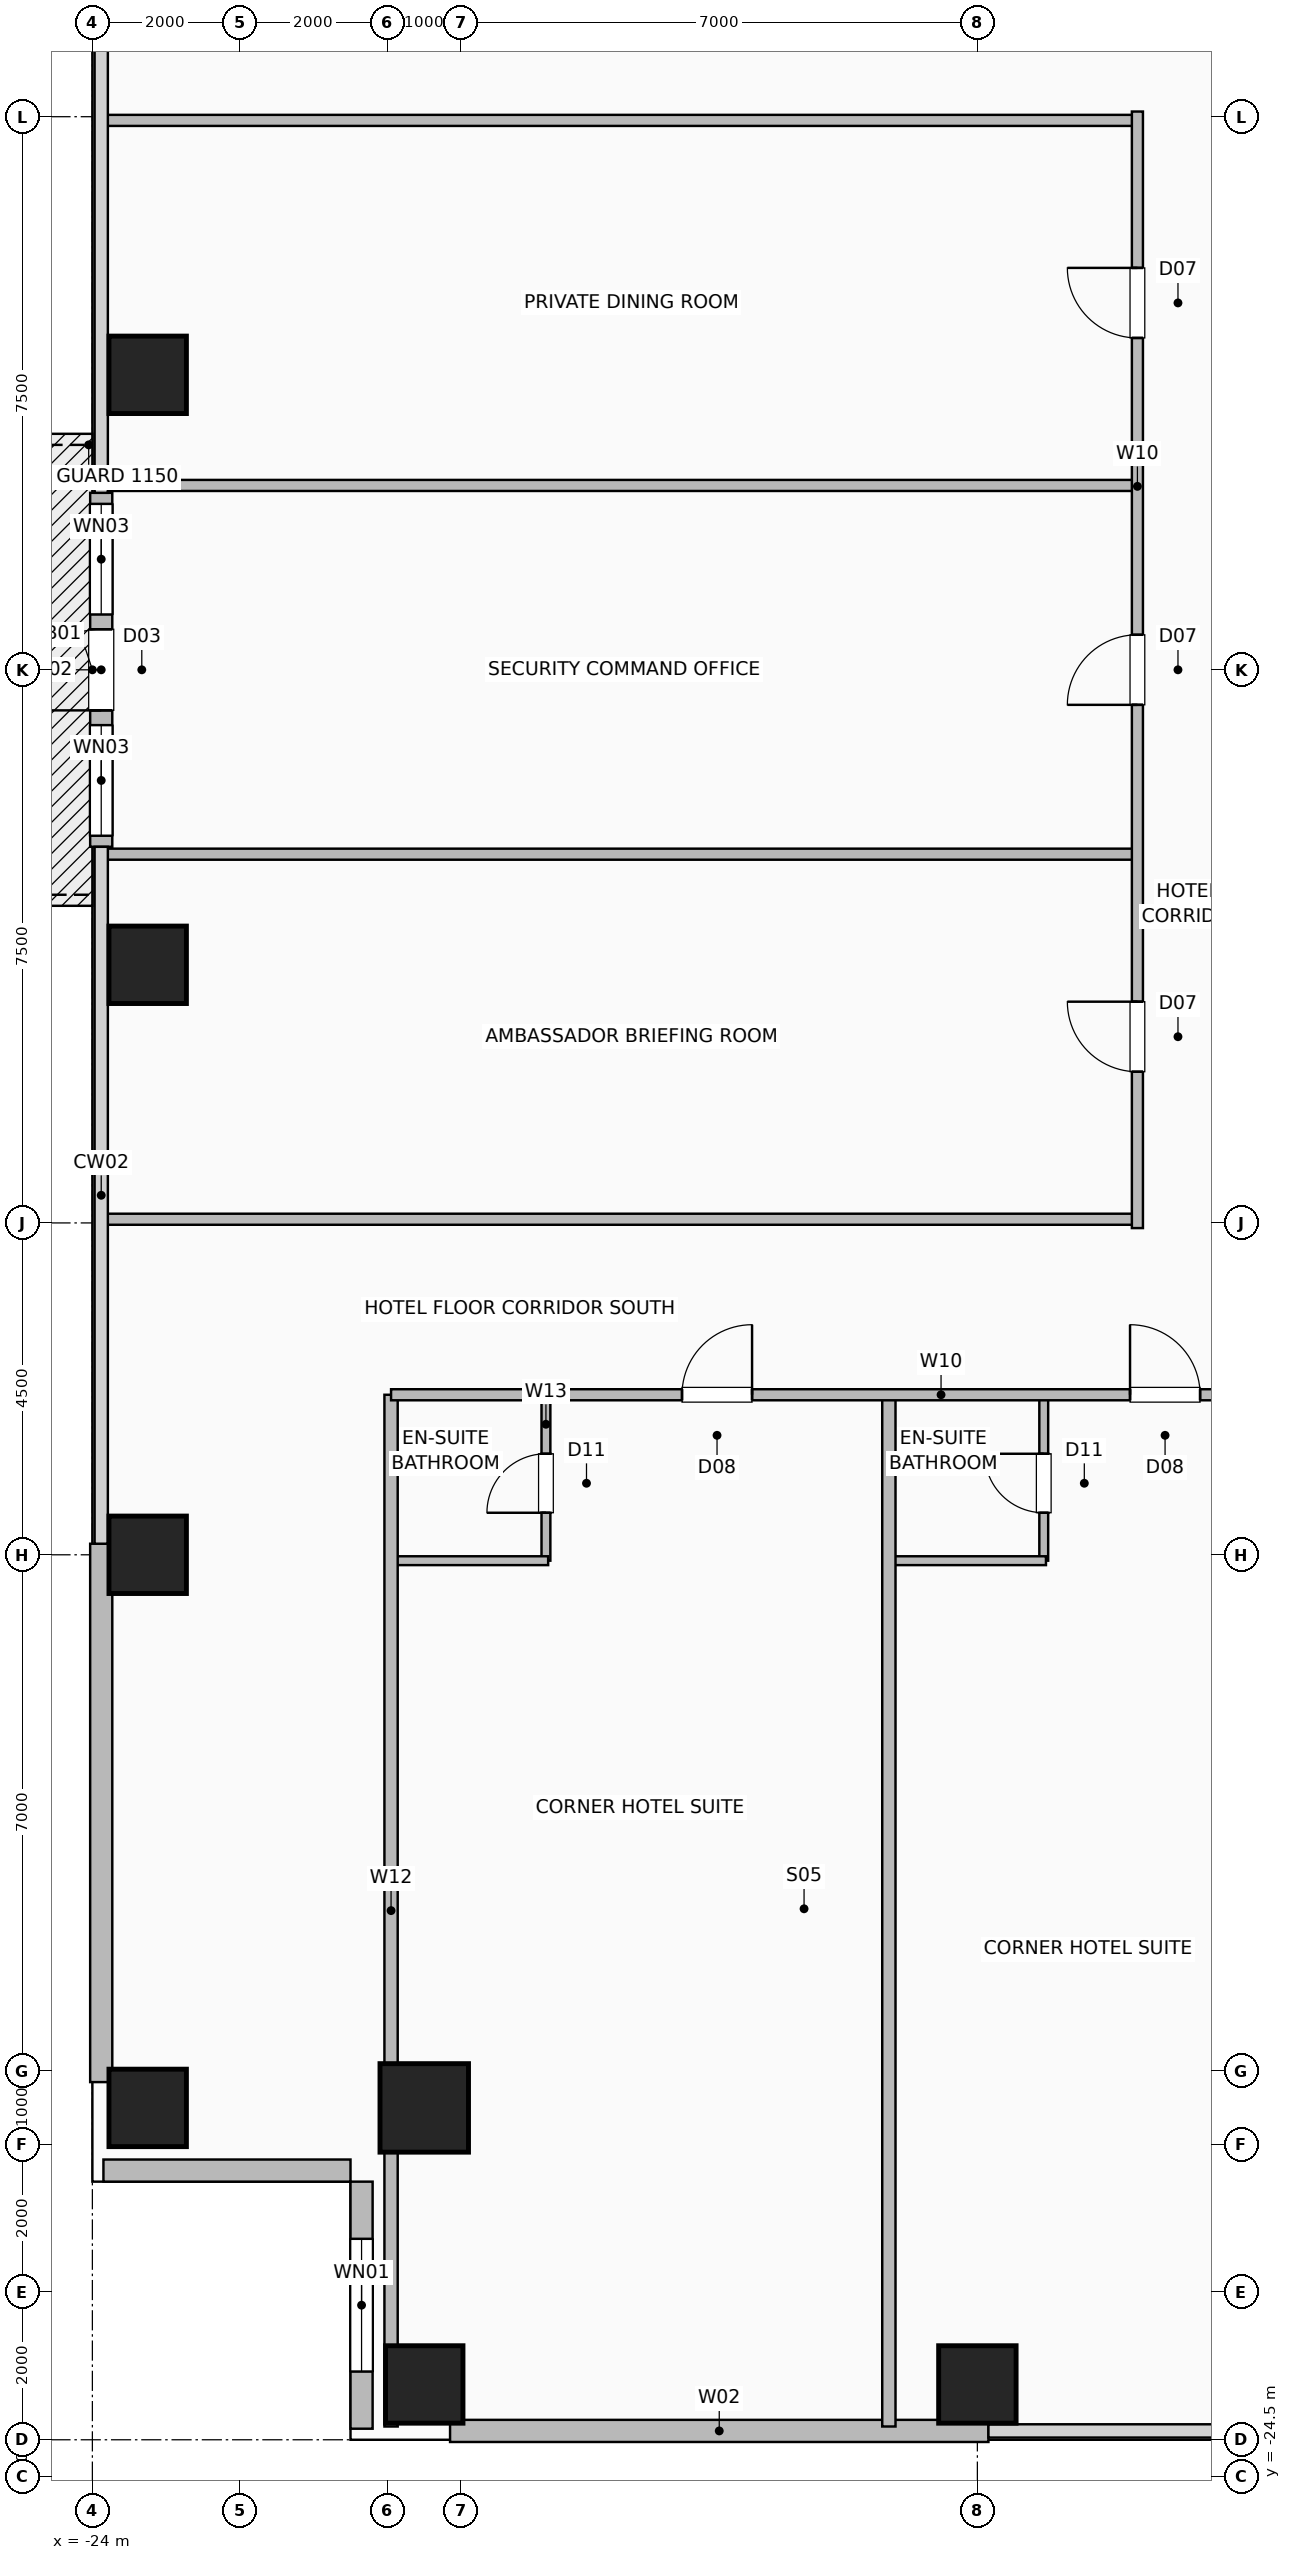
"""IFC4 building model, lengths in metres.
Left out: names, types, materials, properties, quantities, classifications, styles, units other than length and angle.
Written with IfcOpenShell. Run it as: python <this file> out.ifc"""

import sys

from ifc_helpers import new_model, si_unit, direction, frame, frame_2d, origin, origin_2d, place, context, subcontext, project, spatial, rectangle, hollow_rectangle, extrude, element, fill, save


model = new_model("IFC4")
c1 = context("Model", 3, precision=1e-05, world=origin(), true_north=direction((0.0, 1.0)))
c2 = subcontext(c1, "Body", "Model", "MODEL_VIEW")
j1 = project(units=[si_unit("LENGTHUNIT", "METRE"), si_unit("PLANEANGLEUNIT", "RADIAN")], contexts=[c1])
p1 = place(None, origin())
s1 = spatial("IfcSite", under=j1, at=p1, CompositionType="ELEMENT")
p2 = place(p1, origin())
s2 = spatial("IfcBuilding", under=s1, at=p2, CompositionType="ELEMENT")
p3 = place(p2, frame((0.0, 0.0, 76.0)))
s3 = spatial("IfcBuildingStorey", under=s2, at=p3, CompositionType="ELEMENT", Elevation=76.0)
for number, where, z_axis, x_axis in (
    (1, (-19.5, -23.25, 0.0), (0.0, 0.0, 1.0), (1.0, 0.0, 0.0)),
    (2, (-23.25, -19.5, 0.0), (0.0, 0.0, 1.0), (1.0, 0.0, 0.0)),
    (3, (-12.0, -23.25, 0.0), (0.0, 0.0, 1.0), (1.0, 0.0, 0.0)),
    (4, (-23.25, -12.0, 0.0), (0.0, 0.0, 1.0), (1.0, 0.0, 0.0)),
    (5, (-23.25, -4.0, 0.0), (0.0, 0.0, 1.0), (1.0, 0.0, 0.0)),
    (6, (-23.25, 4.0, 0.0), (0.0, 0.0, 1.0), (1.0, 0.0, 0.0)),
):
    element("IfcColumn", number, at=place(p3, frame(where, z_axis=z_axis, x_axis=x_axis)), inside=s3, PredefinedType="COLUMN", context=c2, shape_type="SweptSolid", body=[
        extrude(hollow_rectangle(XDim=1.05, YDim=1.05, WallThickness=0.05, at=origin_2d()), origin(), (0.0, 0.0, 1.0), 3.5),
    ])
p4 = place(p3, frame((-19.5, -19.5, 0.0), z_axis=(0.0, 0.0, 1.0), x_axis=(1.0, 0.0, 0.0)))
e7 = element("IfcColumn", 7, at=p4, inside=s3, PredefinedType="COLUMN", context=c2, shape_type="SweptSolid", body=[
    extrude(hollow_rectangle(XDim=1.2, YDim=1.2, WallThickness=0.055, at=origin_2d()), origin(), (0.0, 0.0, 1.0), 3.5),
])
for number, where, z_axis, x_axis in (
    (8, (-19.15, -23.88, 0.0), (0.0, 0.0, 1.0), (1.0, 0.0, 0.0)),
    (9, (-23.88, -19.15, 0.0), (0.0, 0.0, 1.0), (0.0, 1.0, 0.0)),
):
    element("IfcWall", number, at=place(p3, frame(where, z_axis=z_axis, x_axis=x_axis)), inside=s3, PredefinedType="SOLIDWALL", context=c2, shape_type="SweptSolid", body=[
        extrude(rectangle(XDim=7.3, YDim=0.3, at=frame_2d((3.65, 0.0))), origin(), (0.0, 0.0, 1.0), 3.25),
    ])
p5 = place(p3, frame((-23.88, -2.4, 0.0), z_axis=(0.0, 0.0, 1.0), x_axis=(0.0, 1.0, 0.0)))
e10 = element("IfcWall", 10, at=p5, inside=s3, PredefinedType="SOLIDWALL", context=c2, shape_type="SweptSolid", body=[
    extrude(rectangle(XDim=4.8, YDim=0.3, at=frame_2d((2.4, 0.0))), origin(), (0.0, 0.0, 1.0), 3.25),
])
p6 = place(p5, frame((1.85, 0.0, 0.0)))
e11 = element("IfcOpeningElement", 11, at=p6, cuts=e10, PredefinedType="OPENING", context=c2, shape_type="SweptSolid", body=[
    extrude(rectangle(XDim=1.1, YDim=2.2, at=frame_2d((0.55, 1.1))), frame((0.0, 0.16, 0.0), z_axis=(0.0, -1.0, 0.0), x_axis=(1.0, 0.0, 0.0)), (0.0, 0.0, 1.0), 0.32),
])
p7 = place(p5, frame((0.15, 0.0, 0.85)))
e12 = element("IfcOpeningElement", 12, at=p7, cuts=e10, PredefinedType="OPENING", context=c2, shape_type="SweptSolid", body=[
    extrude(rectangle(XDim=1.5, YDim=1.8, at=frame_2d((0.75, 0.9))), frame((0.0, 0.16, 0.0), z_axis=(0.0, -1.0, 0.0), x_axis=(1.0, 0.0, 0.0)), (0.0, 0.0, 1.0), 0.32),
])
p8 = place(p5, frame((3.15, 0.0, 0.85)))
e13 = element("IfcOpeningElement", 13, at=p8, cuts=e10, PredefinedType="OPENING", context=c2, shape_type="SweptSolid", body=[
    extrude(rectangle(XDim=1.5, YDim=1.8, at=frame_2d((0.75, 0.9))), frame((0.0, 0.16, 0.0), z_axis=(0.0, -1.0, 0.0), x_axis=(1.0, 0.0, 0.0)), (0.0, 0.0, 1.0), 0.32),
])
p9 = place(p3, frame((-20.35, -23.85, 0.0), z_axis=(0.0, 0.0, 1.0), x_axis=(0.0, 1.0, 0.0)))
e14 = element("IfcWall", 14, at=p9, inside=s3, PredefinedType="SOLIDWALL", context=c2, shape_type="SweptSolid", body=[
    extrude(rectangle(XDim=3.35, YDim=0.3, at=frame_2d((1.675, 0.0))), origin(), (0.0, 0.0, 1.0), 3.25),
])
p10 = place(p9, frame((0.775, 0.0, 0.9)))
e15 = element("IfcOpeningElement", 15, at=p10, cuts=e14, PredefinedType="OPENING", context=c2, shape_type="SweptSolid", body=[
    extrude(rectangle(XDim=1.8, YDim=1.8, at=frame_2d((0.9, 0.9))), frame((0.0, 0.16, 0.0), z_axis=(0.0, -1.0, 0.0), x_axis=(1.0, 0.0, 0.0)), (0.0, 0.0, 1.0), 0.32),
])
p11 = place(p3, frame((-23.85, -20.35, 0.0), z_axis=(0.0, 0.0, 1.0), x_axis=(1.0, 0.0, 0.0)))
e16 = element("IfcWall", 16, at=p11, inside=s3, PredefinedType="SOLIDWALL", context=c2, shape_type="SweptSolid", body=[
    extrude(rectangle(XDim=3.35, YDim=0.3, at=frame_2d((1.675, 0.0))), origin(), (0.0, 0.0, 1.0), 3.25),
])
p12 = place(p3, frame((-17.85, -12.08, 0.0), z_axis=(0.0, 0.0, 1.0), x_axis=(0.0, 1.0, 0.0)))
e17 = element("IfcWall", 17, at=p12, inside=s3, PredefinedType="PLUMBINGWALL", context=c2, shape_type="SweptSolid", body=[
    extrude(rectangle(XDim=2.25, YDim=0.12, at=frame_2d((1.125, 0.0))), origin(), (0.0, 0.0, 1.0), 3.25),
])
p13 = place(p12, frame((0.65, 0.0, 0.0)))
e18 = element("IfcOpeningElement", 18, at=p13, cuts=e17, PredefinedType="OPENING", context=c2, shape_type="SweptSolid", body=[
    extrude(rectangle(XDim=0.8, YDim=2.05, at=frame_2d((0.4, 1.025))), frame((0.0, 0.07, 0.0), z_axis=(0.0, -1.0, 0.0), x_axis=(1.0, 0.0, 0.0)), (0.0, 0.0, 1.0), 0.14),
])
p14 = place(p3, frame((-19.92, -12.08, 0.0), z_axis=(0.0, 0.0, 1.0), x_axis=(1.0, 0.0, 0.0)))
e19 = element("IfcWall", 19, at=p14, inside=s3, PredefinedType="PLUMBINGWALL", context=c2, shape_type="SweptSolid", body=[
    extrude(rectangle(XDim=2.1, YDim=0.12, at=frame_2d((1.05, 0.0))), origin(), (0.0, 0.0, 1.0), 3.25),
])
p15 = place(p3, frame((-11.1, -12.08, 0.0), z_axis=(0.0, 0.0, 1.0), x_axis=(0.0, 1.0, 0.0)))
e20 = element("IfcWall", 20, at=p15, inside=s3, PredefinedType="PLUMBINGWALL", context=c2, shape_type="SweptSolid", body=[
    extrude(rectangle(XDim=2.25, YDim=0.12, at=frame_2d((1.125, 0.0))), origin(), (0.0, 0.0, 1.0), 3.25),
])
p16 = place(p15, frame((0.65, 0.0, 0.0)))
e21 = element("IfcOpeningElement", 21, at=p16, cuts=e20, PredefinedType="OPENING", context=c2, shape_type="SweptSolid", body=[
    extrude(rectangle(XDim=0.8, YDim=2.05, at=frame_2d((0.4, 1.025))), frame((0.0, 0.07, 0.0), z_axis=(0.0, -1.0, 0.0), x_axis=(1.0, 0.0, 0.0)), (0.0, 0.0, 1.0), 0.14),
])
p17 = place(p3, frame((-13.17, -12.08, 0.0), z_axis=(0.0, 0.0, 1.0), x_axis=(1.0, 0.0, 0.0)))
e22 = element("IfcWall", 22, at=p17, inside=s3, PredefinedType="PLUMBINGWALL", context=c2, shape_type="SweptSolid", body=[
    extrude(rectangle(XDim=2.1, YDim=0.12, at=frame_2d((1.05, 0.0))), origin(), (0.0, 0.0, 1.0), 3.25),
])
for number, where, z_axis, x_axis in (
    (23, (-19.95, -23.82, 0.0), (0.0, 0.0, 1.0), (0.0, 1.0, 0.0)),
    (24, (-13.2, -23.82, 0.0), (0.0, 0.0, 1.0), (0.0, 1.0, 0.0)),
):
    element("IfcWall", number, at=place(p3, frame(where, z_axis=z_axis, x_axis=x_axis)), inside=s3, PredefinedType="PARTITIONING", context=c2, shape_type="SweptSolid", body=[
        extrude(rectangle(XDim=13.99, YDim=0.18, at=frame_2d((6.995, 0.0))), origin(), (0.0, 0.0, 1.0), 3.25),
    ])
p18 = place(p3, frame((-19.95, -9.83, 0.0), z_axis=(0.0, 0.0, 1.0), x_axis=(1.0, 0.0, 0.0)))
e25 = element("IfcWall", 25, at=p18, inside=s3, PredefinedType="PARTITIONING", context=c2, shape_type="SweptSolid", body=[
    extrude(rectangle(XDim=39.9, YDim=0.15, at=frame_2d((19.95, 0.0))), origin(), (0.0, 0.0, 1.0), 3.25),
])
p19 = place(p18, frame((3.945, 0.0, 0.0)))
e26 = element("IfcOpeningElement", 26, at=p19, cuts=e25, PredefinedType="OPENING", context=c2, shape_type="SweptSolid", body=[
    extrude(rectangle(XDim=0.95, YDim=2.08, at=frame_2d((0.475, 1.04))), frame((0.0, 0.085, 0.0), z_axis=(0.0, -1.0, 0.0), x_axis=(1.0, 0.0, 0.0)), (0.0, 0.0, 1.0), 0.17),
])
p20 = place(p18, frame((10.02, 0.0, 0.0)))
e27 = element("IfcOpeningElement", 27, at=p20, cuts=e25, PredefinedType="OPENING", context=c2, shape_type="SweptSolid", body=[
    extrude(rectangle(XDim=0.95, YDim=2.08, at=frame_2d((0.475, 1.04))), frame((0.0, 0.085, 0.0), z_axis=(0.0, -1.0, 0.0), x_axis=(1.0, 0.0, 0.0)), (0.0, 0.0, 1.0), 0.17),
])
p21 = place(p18, frame((15.42, 0.0, 0.0)))
e28 = element("IfcOpeningElement", 28, at=p21, cuts=e25, PredefinedType="OPENING", context=c2, shape_type="SweptSolid", body=[
    extrude(rectangle(XDim=0.95, YDim=2.08, at=frame_2d((0.475, 1.04))), frame((0.0, 0.085, 0.0), z_axis=(0.0, -1.0, 0.0), x_axis=(1.0, 0.0, 0.0)), (0.0, 0.0, 1.0), 0.17),
])
p22 = place(p18, frame((20.702, 0.0, 0.0)))
e29 = element("IfcOpeningElement", 29, at=p22, cuts=e25, PredefinedType="OPENING", context=c2, shape_type="SweptSolid", body=[
    extrude(rectangle(XDim=0.95, YDim=2.08, at=frame_2d((0.475, 1.04))), frame((0.0, 0.085, 0.0), z_axis=(0.0, -1.0, 0.0), x_axis=(1.0, 0.0, 0.0)), (0.0, 0.0, 1.0), 0.17),
])
p23 = place(p18, frame((26.02, 0.0, 0.0)))
e30 = element("IfcOpeningElement", 30, at=p23, cuts=e25, PredefinedType="OPENING", context=c2, shape_type="SweptSolid", body=[
    extrude(rectangle(XDim=0.95, YDim=2.08, at=frame_2d((0.475, 1.04))), frame((0.0, 0.085, 0.0), z_axis=(0.0, -1.0, 0.0), x_axis=(1.0, 0.0, 0.0)), (0.0, 0.0, 1.0), 0.17),
])
p24 = place(p18, frame((31.37, 0.0, 0.0)))
e31 = element("IfcOpeningElement", 31, at=p24, cuts=e25, PredefinedType="OPENING", context=c2, shape_type="SweptSolid", body=[
    extrude(rectangle(XDim=0.95, YDim=2.08, at=frame_2d((0.475, 1.04))), frame((0.0, 0.085, 0.0), z_axis=(0.0, -1.0, 0.0), x_axis=(1.0, 0.0, 0.0)), (0.0, 0.0, 1.0), 0.17),
])
p25 = place(p18, frame((37.245, 0.0, 0.0)))
e32 = element("IfcOpeningElement", 32, at=p25, cuts=e25, PredefinedType="OPENING", context=c2, shape_type="SweptSolid", body=[
    extrude(rectangle(XDim=0.95, YDim=2.08, at=frame_2d((0.475, 1.04))), frame((0.0, 0.085, 0.0), z_axis=(0.0, -1.0, 0.0), x_axis=(1.0, 0.0, 0.0)), (0.0, 0.0, 1.0), 0.17),
])
for number, where, z_axis, x_axis in (
    (33, (-23.82, -7.45, 0.0), (0.0, 0.0, 1.0), (1.0, 0.0, 0.0)),
    (34, (-23.82, -2.5, 0.0), (0.0, 0.0, 1.0), (1.0, 0.0, 0.0)),
    (35, (-23.82, 2.5, 0.0), (0.0, 0.0, 1.0), (1.0, 0.0, 0.0)),
    (36, (-23.82, 7.45, 0.0), (0.0, 0.0, 1.0), (1.0, 0.0, 0.0)),
):
    element("IfcWall", number, at=place(p3, frame(where, z_axis=z_axis, x_axis=x_axis)), inside=s3, PredefinedType="PARTITIONING", context=c2, shape_type="SweptSolid", body=[
        extrude(rectangle(XDim=13.99, YDim=0.15, at=frame_2d((6.995, 0.0))), origin(), (0.0, 0.0, 1.0), 3.25),
    ])
p26 = place(p3, frame((-9.83, -7.57, 0.0), z_axis=(0.0, 0.0, 1.0), x_axis=(0.0, 1.0, 0.0)))
e37 = element("IfcWall", 37, at=p26, inside=s3, PredefinedType="PARTITIONING", context=c2, shape_type="SweptSolid", body=[
    extrude(rectangle(XDim=15.14, YDim=0.15, at=frame_2d((7.57, 0.0))), origin(), (0.0, 0.0, 1.0), 3.25),
])
p27 = place(p26, frame((2.12, 0.0, 0.0)))
e38 = element("IfcOpeningElement", 38, at=p27, cuts=e37, PredefinedType="OPENING", context=c2, shape_type="SweptSolid", body=[
    extrude(rectangle(XDim=0.95, YDim=2.06, at=frame_2d((0.475, 1.03))), frame((0.0, 0.085, 0.0), z_axis=(0.0, -1.0, 0.0), x_axis=(1.0, 0.0, 0.0)), (0.0, 0.0, 1.0), 0.17),
])
p28 = place(p26, frame((7.095, 0.0, 0.0)))
e39 = element("IfcOpeningElement", 39, at=p28, cuts=e37, PredefinedType="OPENING", context=c2, shape_type="SweptSolid", body=[
    extrude(rectangle(XDim=0.95, YDim=2.06, at=frame_2d((0.475, 1.03))), frame((0.0, 0.085, 0.0), z_axis=(0.0, -1.0, 0.0), x_axis=(1.0, 0.0, 0.0)), (0.0, 0.0, 1.0), 0.17),
])
p29 = place(p26, frame((12.07, 0.0, 0.0)))
e40 = element("IfcOpeningElement", 40, at=p29, cuts=e37, PredefinedType="OPENING", context=c2, shape_type="SweptSolid", body=[
    extrude(rectangle(XDim=0.95, YDim=2.06, at=frame_2d((0.475, 1.03))), frame((0.0, 0.085, 0.0), z_axis=(0.0, -1.0, 0.0), x_axis=(1.0, 0.0, 0.0)), (0.0, 0.0, 1.0), 0.17),
])
p30 = place(p6, origin())
e41 = element("IfcDoor", 41, at=p30, inside=s3, OperationType="SINGLE_SWING_LEFT", PredefinedType="DOOR", context=c2, shape_type="SweptSolid", body=[
    extrude(rectangle(XDim=1.1, YDim=2.2, at=frame_2d((0.55, 1.1))), frame((0.0, 0.025, 0.0), z_axis=(0.0, -1.0, 0.0), x_axis=(1.0, 0.0, 0.0)), (0.0, 0.0, 1.0), 0.05),
])
fill(e11, e41)
p31 = place(p7, origin())
e42 = element("IfcWindow", 42, at=p31, inside=s3, PartitioningType="SINGLE_PANEL", PredefinedType="WINDOW", context=c2, shape_type="SweptSolid", body=[
    extrude(rectangle(XDim=1.5, YDim=1.8, at=frame_2d((0.75, 0.9))), frame((0.0, 0.03, 0.0), z_axis=(0.0, -1.0, 0.0), x_axis=(1.0, 0.0, 0.0)), (0.0, 0.0, 1.0), 0.06),
])
fill(e12, e42)
p32 = place(p8, origin())
e43 = element("IfcWindow", 43, at=p32, inside=s3, PartitioningType="SINGLE_PANEL", PredefinedType="WINDOW", context=c2, shape_type="SweptSolid", body=[
    extrude(rectangle(XDim=1.5, YDim=1.8, at=frame_2d((0.75, 0.9))), frame((0.0, 0.03, 0.0), z_axis=(0.0, -1.0, 0.0), x_axis=(1.0, 0.0, 0.0)), (0.0, 0.0, 1.0), 0.06),
])
fill(e13, e43)
p33 = place(p10, origin())
e44 = element("IfcWindow", 44, at=p33, inside=s3, PartitioningType="SINGLE_PANEL", PredefinedType="WINDOW", context=c2, shape_type="SweptSolid", body=[
    extrude(rectangle(XDim=1.8, YDim=1.8, at=frame_2d((0.9, 0.9))), frame((0.0, 0.03, 0.0), z_axis=(0.0, -1.0, 0.0), x_axis=(1.0, 0.0, 0.0)), (0.0, 0.0, 1.0), 0.06),
])
fill(e15, e44)
p34 = place(p13, origin())
e45 = element("IfcDoor", 45, at=p34, inside=s3, OperationType="SINGLE_SWING_LEFT", PredefinedType="DOOR", context=c2, shape_type="SweptSolid", body=[
    extrude(rectangle(XDim=0.8, YDim=2.05, at=frame_2d((0.4, 1.025))), frame((0.0, 0.025, 0.0), z_axis=(0.0, -1.0, 0.0), x_axis=(1.0, 0.0, 0.0)), (0.0, 0.0, 1.0), 0.05),
])
fill(e18, e45)
p35 = place(p16, origin())
e46 = element("IfcDoor", 46, at=p35, inside=s3, OperationType="SINGLE_SWING_RIGHT", PredefinedType="DOOR", context=c2, shape_type="SweptSolid", body=[
    extrude(rectangle(XDim=0.8, YDim=2.05, at=frame_2d((0.4, 1.025))), frame((0.0, 0.025, 0.0), z_axis=(0.0, -1.0, 0.0), x_axis=(1.0, 0.0, 0.0)), (0.0, 0.0, 1.0), 0.05),
])
fill(e21, e46)
p36 = place(p19, origin())
e47 = element("IfcDoor", 47, at=p36, inside=s3, OperationType="SINGLE_SWING_RIGHT", PredefinedType="DOOR", context=c2, shape_type="SweptSolid", body=[
    extrude(rectangle(XDim=0.95, YDim=2.08, at=frame_2d((0.475, 1.04))), frame((0.0, 0.025, 0.0), z_axis=(0.0, -1.0, 0.0), x_axis=(1.0, 0.0, 0.0)), (0.0, 0.0, 1.0), 0.05),
])
fill(e26, e47)
p37 = place(p20, origin())
e48 = element("IfcDoor", 48, at=p37, inside=s3, OperationType="SINGLE_SWING_LEFT", PredefinedType="DOOR", context=c2, shape_type="SweptSolid", body=[
    extrude(rectangle(XDim=0.95, YDim=2.08, at=frame_2d((0.475, 1.04))), frame((0.0, 0.025, 0.0), z_axis=(0.0, -1.0, 0.0), x_axis=(1.0, 0.0, 0.0)), (0.0, 0.0, 1.0), 0.05),
])
fill(e27, e48)
p38 = place(p27, origin())
e49 = element("IfcDoor", 49, at=p38, inside=s3, OperationType="SINGLE_SWING_RIGHT", PredefinedType="DOOR", context=c2, shape_type="SweptSolid", body=[
    extrude(rectangle(XDim=0.95, YDim=2.06, at=frame_2d((0.475, 1.03))), frame((0.0, 0.025, 0.0), z_axis=(0.0, -1.0, 0.0), x_axis=(1.0, 0.0, 0.0)), (0.0, 0.0, 1.0), 0.05),
])
fill(e38, e49)
p39 = place(p28, origin())
e50 = element("IfcDoor", 50, at=p39, inside=s3, OperationType="SINGLE_SWING_LEFT", PredefinedType="DOOR", context=c2, shape_type="SweptSolid", body=[
    extrude(rectangle(XDim=0.95, YDim=2.06, at=frame_2d((0.475, 1.03))), frame((0.0, 0.025, 0.0), z_axis=(0.0, -1.0, 0.0), x_axis=(1.0, 0.0, 0.0)), (0.0, 0.0, 1.0), 0.05),
])
fill(e39, e50)
p40 = place(p29, origin())
e51 = element("IfcDoor", 51, at=p40, inside=s3, OperationType="SINGLE_SWING_RIGHT", PredefinedType="DOOR", context=c2, shape_type="SweptSolid", body=[
    extrude(rectangle(XDim=0.95, YDim=2.06, at=frame_2d((0.475, 1.03))), frame((0.0, 0.025, 0.0), z_axis=(0.0, -1.0, 0.0), x_axis=(1.0, 0.0, 0.0)), (0.0, 0.0, 1.0), 0.05),
])
fill(e40, e51)
save(model, sys.argv[1])
